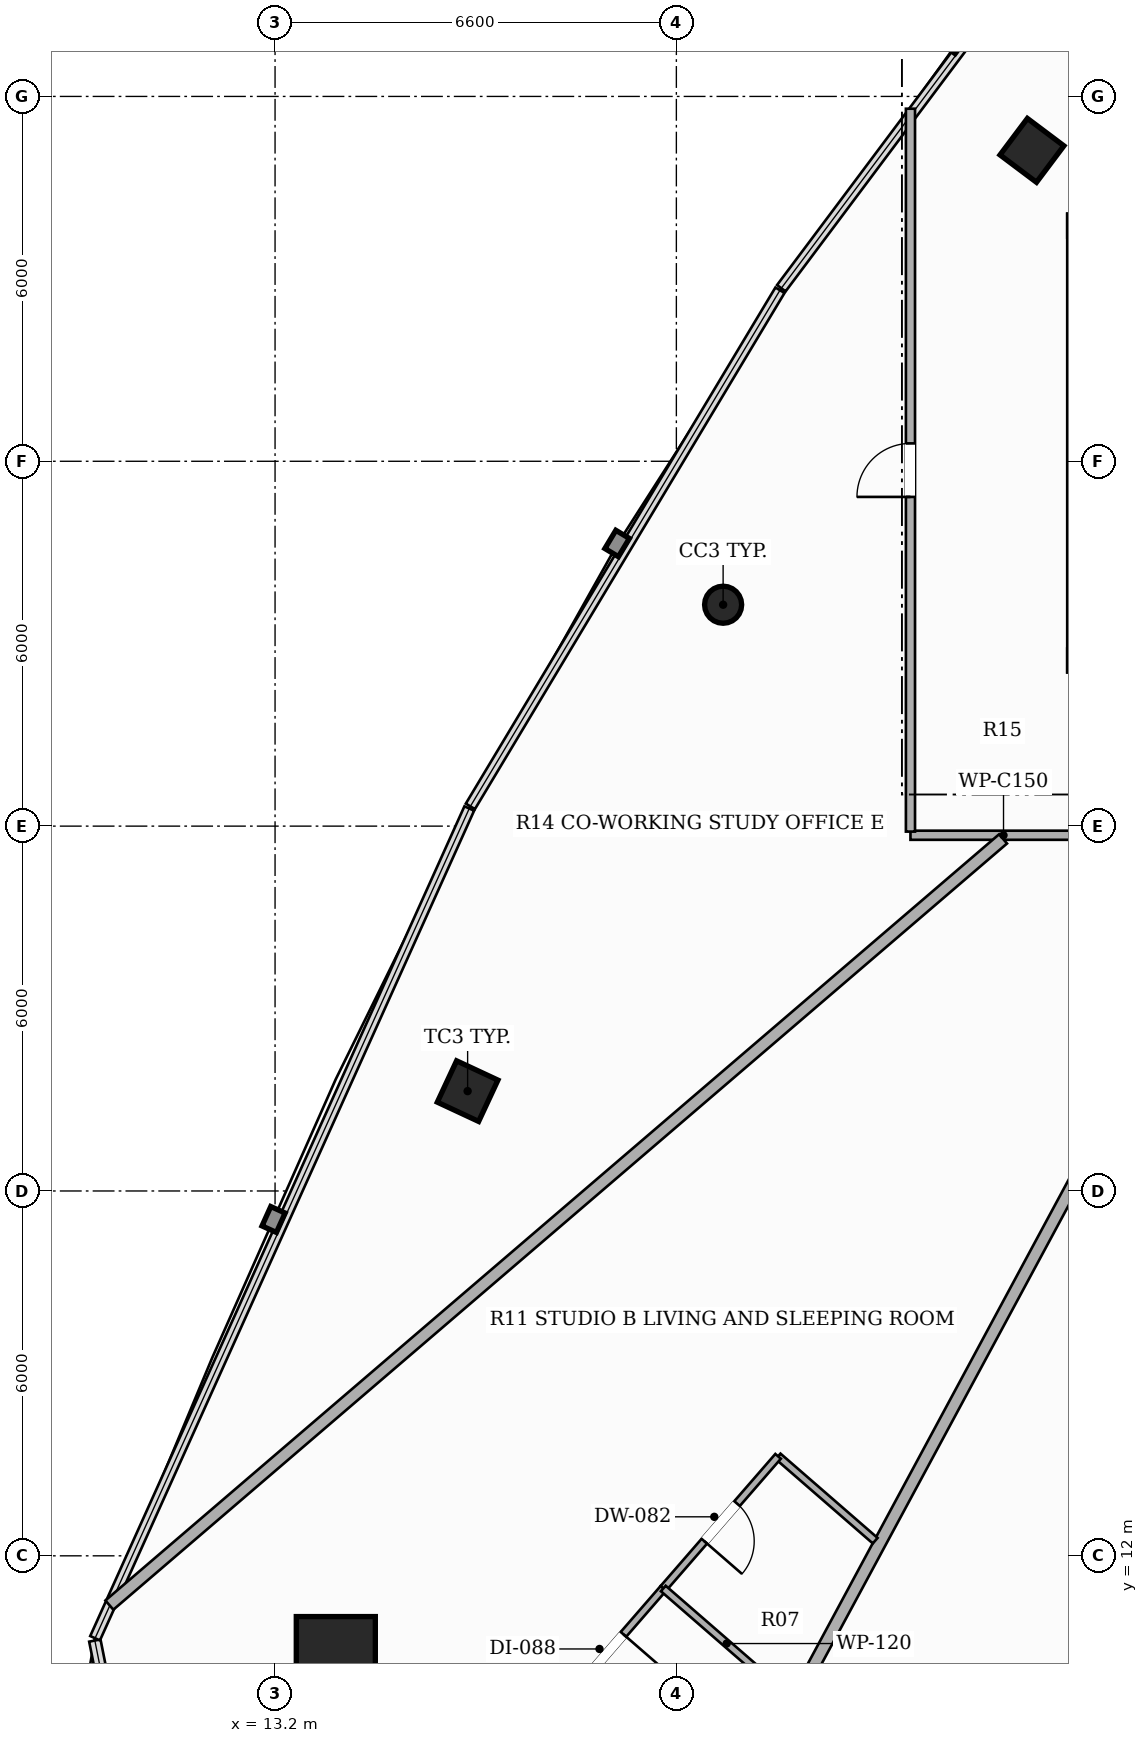
"""IFC4 building model, lengths in metres.
Left out: names, types, materials, properties, quantities, classifications, styles, units other than length and angle.
Written with IfcOpenShell. Run it as: python <this file> out.ifc"""

import sys

from ifc_helpers import new_model, si_unit, direction, frame, frame_2d, origin, origin_2d, place, context, subcontext, project, spatial, rectangle, hollow_rectangle, hollow_circle, extrude, element, fill, save


model = new_model("IFC4")
c1 = context("Model", 3, precision=1e-05, world=origin(), true_north=direction((0.0, 1.0)))
c2 = subcontext(c1, "Body", "Model", "MODEL_VIEW")
j1 = project(units=[si_unit("LENGTHUNIT", "METRE"), si_unit("PLANEANGLEUNIT", "RADIAN")], contexts=[c1])
p1 = place(None, origin())
s1 = spatial("IfcSite", under=j1, at=p1, CompositionType="ELEMENT")
p2 = place(p1, origin())
s2 = spatial("IfcBuilding", under=s1, at=p2, CompositionType="ELEMENT")
p3 = place(p2, frame((0.0, 0.0, 229.4)))
s3 = spatial("IfcBuildingStorey", under=s2, at=p3, CompositionType="ELEMENT", Elevation=229.4)
p4 = place(p3, frame((14.199, 10.351, 0.0), z_axis=(0.0, 0.0, 1.0), x_axis=(1.0, 0.0, 0.0)))
e1 = element("IfcColumn", 1, at=p4, inside=s3, PredefinedType="COLUMN", context=c2, shape_type="SweptSolid", body=[
    extrude(hollow_rectangle(XDim=1.3, YDim=1.3, WallThickness=0.04, at=origin_2d()), origin(), (0.0, 0.0, 1.0), 3.3),
])
p5 = place(p3, frame((25.648, 35.113, 0.0), z_axis=(0.0, 0.0, 1.0), x_axis=(0.600420225326, 0.799684658487, 0.0)))
e2 = element("IfcColumn", 2, at=p5, inside=s3, PredefinedType="COLUMN", context=c2, shape_type="SweptSolid", body=[
    extrude(hollow_rectangle(XDim=0.75, YDim=0.75, WallThickness=0.025, at=origin_2d()), origin(), (0.0, 0.0, 1.0), 3.3),
])
p6 = place(p3, frame((20.569, 27.641, 0.0), z_axis=(0.0, 0.0, 1.0), x_axis=(1.0, 0.0, 0.0)))
e3 = element("IfcColumn", 3, at=p6, inside=s3, PredefinedType="COLUMN", context=c2, shape_type="SweptSolid", body=[
    extrude(hollow_circle(Radius=0.305, WallThickness=0.016, at=origin_2d()), origin(), (0.0, 0.0, 1.0), 3.3),
])
p7 = place(p3, frame((16.367, 19.642, 0.0), z_axis=(0.0, 0.0, 1.0), x_axis=(0.422618261741, 0.906307787037, 0.0)))
e4 = element("IfcColumn", 4, at=p7, inside=s3, PredefinedType="COLUMN", context=c2, shape_type="SweptSolid", body=[
    extrude(hollow_rectangle(XDim=0.75, YDim=0.75, WallThickness=0.025, at=origin_2d()), origin(), (0.0, 0.0, 1.0), 3.3),
])
p8 = place(p3, frame((32.096, 23.85, 0.0), z_axis=(0.0, 0.0, 1.0), x_axis=(-1.0, 0.0, 0.0)))
e5 = element("IfcWall", 5, at=p8, inside=s3, PredefinedType="PARTITIONING", context=c2, shape_type="SweptSolid", body=[
    extrude(rectangle(XDim=8.446, YDim=0.15, at=frame_2d((4.223, 0.0))), origin(), (0.0, 0.0, 1.0), 2.565),
])
p9 = place(p8, frame((4.365, 0.0, 0.0)))
e6 = element("IfcOpeningElement", 6, at=p9, cuts=e5, PredefinedType="OPENING", context=c2, shape_type="SweptSolid", body=[
    extrude(rectangle(XDim=0.92, YDim=2.15, at=frame_2d((0.46, 1.075))), frame((0.0, 0.085, 0.0), z_axis=(0.0, -1.0, 0.0), x_axis=(1.0, 0.0, 0.0)), (0.0, 0.0, 1.0), 0.17),
])
p10 = place(p8, frame((1.045, 0.0, 0.0)))
e7 = element("IfcOpeningElement", 7, at=p10, cuts=e5, PredefinedType="OPENING", context=c2, shape_type="SweptSolid", body=[
    extrude(rectangle(XDim=0.92, YDim=2.15, at=frame_2d((0.46, 1.075))), frame((0.0, 0.085, 0.0), z_axis=(0.0, -1.0, 0.0), x_axis=(1.0, 0.0, 0.0)), (0.0, 0.0, 1.0), 0.17),
])
p11 = place(p3, frame((23.65, 23.91, 0.0), z_axis=(0.0, 0.0, 1.0), x_axis=(0.0, 1.0, 0.0)))
e8 = element("IfcWall", 8, at=p11, inside=s3, PredefinedType="PARTITIONING", context=c2, shape_type="SweptSolid", body=[
    extrude(rectangle(XDim=11.888, YDim=0.15, at=frame_2d((5.944, 0.0))), origin(), (0.0, 0.0, 1.0), 2.492),
])
p12 = place(p11, frame((5.504, 0.0, 0.0)))
e9 = element("IfcOpeningElement", 9, at=p12, cuts=e8, PredefinedType="OPENING", context=c2, shape_type="SweptSolid", body=[
    extrude(rectangle(XDim=0.88, YDim=2.1, at=frame_2d((0.44, 1.05))), frame((0.0, 0.085, 0.0), z_axis=(0.0, -1.0, 0.0), x_axis=(1.0, 0.0, 0.0)), (0.0, 0.0, 1.0), 0.17),
])
p13 = place(p3, frame((29.385, 23.79, 0.0), z_axis=(0.0, 0.0, 1.0), x_axis=(-0.474361203305, -0.880330306646, 0.0)))
e10 = element("IfcWall", 10, at=p13, inside=s3, PredefinedType="PARTITIONING", context=c2, shape_type="SweptSolid", body=[
    extrude(rectangle(XDim=20.44, YDim=0.2, at=frame_2d((10.22, 0.0))), origin(), (0.0, 0.0, 1.0), 2.492),
])
p14 = place(p3, frame((10.475, 11.19, 0.0), z_axis=(0.0, 0.0, 1.0), x_axis=(0.759210311249, 0.650845375871, 0.0)))
e11 = element("IfcWall", 11, at=p14, inside=s3, PredefinedType="PARTITIONING", context=c2, shape_type="SweptSolid", body=[
    extrude(rectangle(XDim=19.36, YDim=0.2, at=frame_2d((9.68, 0.0))), origin(), (0.0, 0.0, 1.0), 2.492),
])
p15 = place(p3, frame((23.07, 12.249, 0.0), z_axis=(0.0, 0.0, 1.0), x_axis=(-0.75504514731, 0.655672803709, 0.0)))
e12 = element("IfcWall", 12, at=p15, inside=s3, PredefinedType="PARTITIONING", context=c2, shape_type="SweptSolid", body=[
    extrude(rectangle(XDim=2.115, YDim=0.12, at=frame_2d((1.058, 0.0))), origin(), (0.0, 0.0, 1.0), 2.773),
])
p16 = place(p3, frame((21.473, 13.636, 0.0), z_axis=(0.0, 0.0, 1.0), x_axis=(-0.655840593364, -0.754899407932, 0.0)))
e13 = element("IfcWall", 13, at=p16, inside=s3, PredefinedType="PARTITIONING", context=c2, shape_type="SweptSolid", body=[
    extrude(rectangle(XDim=2.879, YDim=0.12, at=frame_2d((1.439, 0.0))), origin(), (0.0, 0.0, 1.0), 2.773),
])
p17 = place(p16, frame((1.029, 0.0, 0.0)))
e14 = element("IfcOpeningElement", 14, at=p17, cuts=e13, PredefinedType="OPENING", context=c2, shape_type="SweptSolid", body=[
    extrude(rectangle(XDim=0.82, YDim=2.1, at=frame_2d((0.41, 1.05))), frame((0.0, 0.07, 0.0), z_axis=(0.0, -1.0, 0.0), x_axis=(1.0, 0.0, 0.0)), (0.0, 0.0, 1.0), 0.14),
])
p18 = place(p3, frame((19.585, 11.463, 0.0), z_axis=(0.0, 0.0, 1.0), x_axis=(-0.655689200825, -0.755030907924, 0.0)))
e15 = element("IfcWall", 15, at=p18, inside=s3, PredefinedType="PARTITIONING", context=c2, shape_type="SweptSolid", body=[
    extrude(rectangle(XDim=2.878, YDim=0.12, at=frame_2d((1.439, 0.0))), origin(), (0.0, 0.0, 1.0), 2.492),
])
p19 = place(p18, frame((0.999, 0.0, 0.0)))
e16 = element("IfcOpeningElement", 16, at=p19, cuts=e15, PredefinedType="OPENING", context=c2, shape_type="SweptSolid", body=[
    extrude(rectangle(XDim=0.88, YDim=2.1, at=frame_2d((0.44, 1.05))), frame((0.0, 0.07, 0.0), z_axis=(0.0, -1.0, 0.0), x_axis=(1.0, 0.0, 0.0)), (0.0, 0.0, 1.0), 0.14),
])
p20 = place(p3, frame((21.67, 9.652, 0.0), z_axis=(0.0, 0.0, 1.0), x_axis=(-0.755003171317, 0.655721138367, 0.0)))
e17 = element("IfcWall", 17, at=p20, inside=s3, PredefinedType="PARTITIONING", context=c2, shape_type="SweptSolid", body=[
    extrude(rectangle(XDim=2.761, YDim=0.12, at=frame_2d((1.381, 0.0))), origin(), (0.0, 0.0, 1.0), 2.773),
])
p21 = place(p17, origin())
e18 = element("IfcDoor", 18, at=p21, inside=s3, OperationType="SINGLE_SWING_RIGHT", PredefinedType="DOOR", context=c2, shape_type="SweptSolid", body=[
    extrude(rectangle(XDim=0.82, YDim=2.1, at=frame_2d((0.41, 1.05))), frame((0.0, 0.025, 0.0), z_axis=(0.0, -1.0, 0.0), x_axis=(1.0, 0.0, 0.0)), (0.0, 0.0, 1.0), 0.05),
])
fill(e14, e18)
p22 = place(p19, origin())
e19 = element("IfcDoor", 19, at=p22, inside=s3, OperationType="SINGLE_SWING_LEFT", PredefinedType="DOOR", context=c2, shape_type="SweptSolid", body=[
    extrude(rectangle(XDim=0.88, YDim=2.1, at=frame_2d((0.44, 1.05))), frame((0.0, 0.025, 0.0), z_axis=(0.0, -1.0, 0.0), x_axis=(1.0, 0.0, 0.0)), (0.0, 0.0, 1.0), 0.05),
])
fill(e16, e19)
p23 = place(p12, origin())
e20 = element("IfcDoor", 20, at=p23, inside=s3, OperationType="SINGLE_SWING_LEFT", PredefinedType="DOOR", context=c2, shape_type="SweptSolid", body=[
    extrude(rectangle(XDim=0.88, YDim=2.1, at=frame_2d((0.44, 1.05))), frame((0.0, 0.025, 0.0), z_axis=(0.0, -1.0, 0.0), x_axis=(1.0, 0.0, 0.0)), (0.0, 0.0, 1.0), 0.05),
])
fill(e9, e20)
save(model, sys.argv[1])
